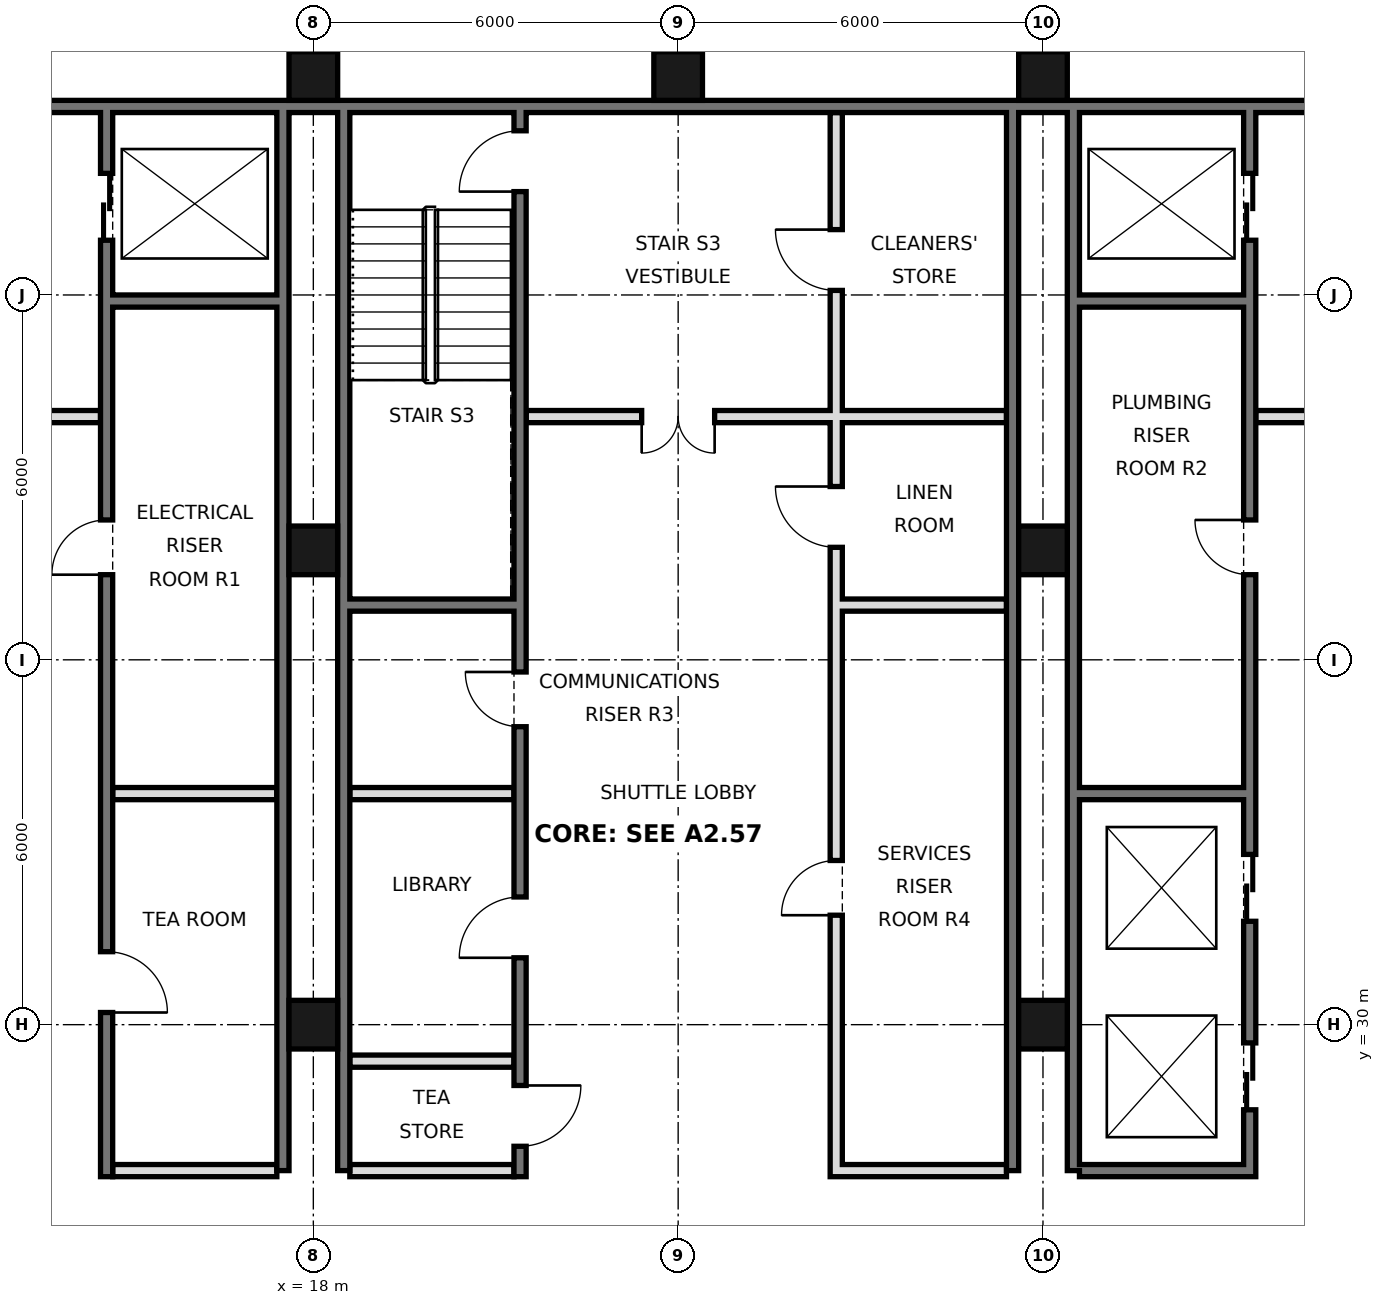
"""IFC4 building model, lengths in metres.
Left out: names, types, materials, properties, quantities, classifications, styles, units other than length and angle.
Written with IfcOpenShell. Run it as: python <this file> out.ifc"""

import sys

from ifc_helpers import new_model, si_unit, direction, frame, frame_2d, origin, origin_2d, place, context, subcontext, project, spatial, rectangle, hollow_rectangle, extrude, element, fill, save


model = new_model("IFC4")
c1 = context("Model", 3, precision=1e-05, world=origin(), true_north=direction((0.0, 1.0)))
c2 = subcontext(c1, "Body", "Model", "MODEL_VIEW")
j1 = project(units=[si_unit("LENGTHUNIT", "METRE"), si_unit("PLANEANGLEUNIT", "RADIAN")], contexts=[c1])
p1 = place(None, origin())
s1 = spatial("IfcSite", under=j1, at=p1, CompositionType="ELEMENT")
p2 = place(p1, origin())
s2 = spatial("IfcBuilding", under=s1, at=p2, CompositionType="ELEMENT")
p3 = place(p2, frame((0.0, 0.0, 226.2)))
s3 = spatial("IfcBuildingStorey", under=s2, at=p3, CompositionType="ELEMENT", Elevation=226.2)
for number, where, z_axis, x_axis in (
    (1, (18.0, 30.0, 0.0), (0.0, 0.0, 1.0), (1.0, 0.0, 0.0)),
    (2, (18.0, 37.8, 0.0), (0.0, 0.0, 1.0), (1.0, 0.0, 0.0)),
    (3, (18.0, 45.6, 0.0), (0.0, 0.0, 1.0), (1.0, 0.0, 0.0)),
    (4, (24.0, 45.6, 0.0), (0.0, 0.0, 1.0), (1.0, 0.0, 0.0)),
    (5, (30.0, 30.0, 0.0), (0.0, 0.0, 1.0), (1.0, 0.0, 0.0)),
    (6, (30.0, 37.8, 0.0), (0.0, 0.0, 1.0), (1.0, 0.0, 0.0)),
    (7, (30.0, 45.6, 0.0), (0.0, 0.0, 1.0), (1.0, 0.0, 0.0)),
):
    element("IfcColumn", number, at=place(p3, frame(where, z_axis=z_axis, x_axis=x_axis)), inside=s3, PredefinedType="COLUMN", context=c2, shape_type="SweptSolid", body=[
        extrude(hollow_rectangle(XDim=0.8, YDim=0.8, WallThickness=0.04, at=origin_2d()), origin(), (0.0, 0.0, 1.0), 3.6),
    ])
p4 = place(p3, frame((6.6, 45.1, 0.0), z_axis=(0.0, 0.0, 1.0), x_axis=(1.0, 0.0, 0.0)))
e8 = element("IfcWall", 8, at=p4, inside=s3, PredefinedType="SOLIDWALL", context=c2, shape_type="SweptSolid", body=[
    extrude(rectangle(XDim=34.8, YDim=0.2, at=frame_2d((17.4, 0.0))), origin(), (0.0, 0.0, 1.0), 3.42),
])
for number, where, z_axis, x_axis in (
    (9, (17.5, 27.6, 0.0), (0.0, 0.0, 1.0), (0.0, 1.0, 0.0)),
    (10, (18.5, 27.6, 0.0), (0.0, 0.0, 1.0), (0.0, 1.0, 0.0)),
    (11, (29.5, 27.6, 0.0), (0.0, 0.0, 1.0), (0.0, 1.0, 0.0)),
    (12, (30.5, 27.6, 0.0), (0.0, 0.0, 1.0), (0.0, 1.0, 0.0)),
):
    element("IfcWall", number, at=place(p3, frame(where, z_axis=z_axis, x_axis=x_axis)), inside=s3, PredefinedType="SOLIDWALL", context=c2, shape_type="SweptSolid", body=[
        extrude(rectangle(XDim=17.5, YDim=0.2, at=frame_2d((8.75, 0.0))), origin(), (0.0, 0.0, 1.0), 3.42),
    ])
p5 = place(p3, frame((14.6, 27.5, 0.0), z_axis=(0.0, 0.0, 1.0), x_axis=(0.0, 1.0, 0.0)))
e13 = element("IfcWall", 13, at=p5, inside=s3, PredefinedType="SOLIDWALL", context=c2, shape_type="SweptSolid", body=[
    extrude(rectangle(XDim=17.5, YDim=0.2, at=frame_2d((8.75, 0.0))), origin(), (0.0, 0.0, 1.0), 3.42),
])
p6 = place(p5, frame((15.4, 0.0, 0.0)))
e14 = element("IfcOpeningElement", 14, at=p6, cuts=e13, PredefinedType="OPENING", context=c2, shape_type="SweptSolid", body=[
    extrude(rectangle(XDim=1.1, YDim=2.1, at=frame_2d((0.55, 1.05))), frame((0.0, 0.11, 0.0), z_axis=(0.0, -1.0, 0.0), x_axis=(1.0, 0.0, 0.0)), (0.0, 0.0, 1.0), 0.22),
])
p7 = place(p5, frame((2.7, 0.0, 0.0)))
e15 = element("IfcOpeningElement", 15, at=p7, cuts=e13, PredefinedType="OPENING", context=c2, shape_type="SweptSolid", body=[
    extrude(rectangle(XDim=1.0, YDim=2.1, at=frame_2d((0.5, 1.05))), frame((0.0, 0.11, 0.0), z_axis=(0.0, -1.0, 0.0), x_axis=(1.0, 0.0, 0.0)), (0.0, 0.0, 1.0), 0.22),
])
p8 = place(p5, frame((9.9, 0.0, 0.0)))
e16 = element("IfcOpeningElement", 16, at=p8, cuts=e13, PredefinedType="OPENING", context=c2, shape_type="SweptSolid", body=[
    extrude(rectangle(XDim=0.9, YDim=2.1, at=frame_2d((0.45, 1.05))), frame((0.0, 0.11, 0.0), z_axis=(0.0, -1.0, 0.0), x_axis=(1.0, 0.0, 0.0)), (0.0, 0.0, 1.0), 0.22),
])
p9 = place(p3, frame((21.4, 27.5, 0.0), z_axis=(0.0, 0.0, 1.0), x_axis=(0.0, 1.0, 0.0)))
e17 = element("IfcWall", 17, at=p9, inside=s3, PredefinedType="SOLIDWALL", context=c2, shape_type="SweptSolid", body=[
    extrude(rectangle(XDim=17.5, YDim=0.2, at=frame_2d((8.75, 0.0))), origin(), (0.0, 0.0, 1.0), 3.42),
])
p10 = place(p9, frame((0.5, 0.0, 0.0)))
e18 = element("IfcOpeningElement", 18, at=p10, cuts=e17, PredefinedType="OPENING", context=c2, shape_type="SweptSolid", body=[
    extrude(rectangle(XDim=1.0, YDim=2.1, at=frame_2d((0.5, 1.05))), frame((0.0, 0.11, 0.0), z_axis=(0.0, -1.0, 0.0), x_axis=(1.0, 0.0, 0.0)), (0.0, 0.0, 1.0), 0.22),
])
p11 = place(p9, frame((3.6, 0.0, 0.0)))
e19 = element("IfcOpeningElement", 19, at=p11, cuts=e17, PredefinedType="OPENING", context=c2, shape_type="SweptSolid", body=[
    extrude(rectangle(XDim=1.0, YDim=2.1, at=frame_2d((0.5, 1.05))), frame((0.0, 0.11, 0.0), z_axis=(0.0, -1.0, 0.0), x_axis=(1.0, 0.0, 0.0)), (0.0, 0.0, 1.0), 0.22),
])
p12 = place(p9, frame((16.2, 0.0, 0.0)))
e20 = element("IfcOpeningElement", 20, at=p12, cuts=e17, PredefinedType="OPENING", context=c2, shape_type="SweptSolid", body=[
    extrude(rectangle(XDim=1.0, YDim=2.1, at=frame_2d((0.5, 1.05))), frame((0.0, 0.11, 0.0), z_axis=(0.0, -1.0, 0.0), x_axis=(1.0, 0.0, 0.0)), (0.0, 0.0, 1.0), 0.22),
])
p13 = place(p9, frame((7.4, 0.0, 0.0)))
e21 = element("IfcOpeningElement", 21, at=p13, cuts=e17, PredefinedType="OPENING", context=c2, shape_type="SweptSolid", body=[
    extrude(rectangle(XDim=0.9, YDim=2.1, at=frame_2d((0.45, 1.05))), frame((0.0, 0.11, 0.0), z_axis=(0.0, -1.0, 0.0), x_axis=(1.0, 0.0, 0.0)), (0.0, 0.0, 1.0), 0.22),
])
p14 = place(p3, frame((26.6, 27.5, 0.0), z_axis=(0.0, 0.0, 1.0), x_axis=(0.0, 1.0, 0.0)))
e22 = element("IfcWall", 22, at=p14, inside=s3, PredefinedType="SOLIDWALL", context=c2, shape_type="SweptSolid", body=[
    extrude(rectangle(XDim=17.5, YDim=0.2, at=frame_2d((8.75, 0.0))), origin(), (0.0, 0.0, 1.0), 3.42),
])
p15 = place(p14, frame((4.3, 0.0, 0.0)))
e23 = element("IfcOpeningElement", 23, at=p15, cuts=e22, PredefinedType="OPENING", context=c2, shape_type="SweptSolid", body=[
    extrude(rectangle(XDim=0.9, YDim=2.1, at=frame_2d((0.45, 1.05))), frame((0.0, 0.11, 0.0), z_axis=(0.0, -1.0, 0.0), x_axis=(1.0, 0.0, 0.0)), (0.0, 0.0, 1.0), 0.22),
])
p16 = place(p14, frame((10.35, 0.0, 0.0)))
e24 = element("IfcOpeningElement", 24, at=p16, cuts=e22, PredefinedType="OPENING", context=c2, shape_type="SweptSolid", body=[
    extrude(rectangle(XDim=1.0, YDim=2.1, at=frame_2d((0.5, 1.05))), frame((0.0, 0.11, 0.0), z_axis=(0.0, -1.0, 0.0), x_axis=(1.0, 0.0, 0.0)), (0.0, 0.0, 1.0), 0.22),
])
p17 = place(p14, frame((14.575, 0.0, 0.0)))
e25 = element("IfcOpeningElement", 25, at=p17, cuts=e22, PredefinedType="OPENING", context=c2, shape_type="SweptSolid", body=[
    extrude(rectangle(XDim=1.0, YDim=2.1, at=frame_2d((0.5, 1.05))), frame((0.0, 0.11, 0.0), z_axis=(0.0, -1.0, 0.0), x_axis=(1.0, 0.0, 0.0)), (0.0, 0.0, 1.0), 0.22),
])
p18 = place(p3, frame((33.4, 27.5, 0.0), z_axis=(0.0, 0.0, 1.0), x_axis=(0.0, 1.0, 0.0)))
e26 = element("IfcWall", 26, at=p18, inside=s3, PredefinedType="SOLIDWALL", context=c2, shape_type="SweptSolid", body=[
    extrude(rectangle(XDim=17.5, YDim=0.2, at=frame_2d((8.75, 0.0))), origin(), (0.0, 0.0, 1.0), 3.42),
])
p19 = place(p18, frame((1.1, 0.0, 0.0)))
e27 = element("IfcOpeningElement", 27, at=p19, cuts=e26, PredefinedType="OPENING", context=c2, shape_type="SweptSolid", body=[
    extrude(rectangle(XDim=1.1, YDim=2.1, at=frame_2d((0.55, 1.05))), frame((0.0, 0.11, 0.0), z_axis=(0.0, -1.0, 0.0), x_axis=(1.0, 0.0, 0.0)), (0.0, 0.0, 1.0), 0.22),
])
p20 = place(p18, frame((4.2, 0.0, 0.0)))
e28 = element("IfcOpeningElement", 28, at=p20, cuts=e26, PredefinedType="OPENING", context=c2, shape_type="SweptSolid", body=[
    extrude(rectangle(XDim=1.1, YDim=2.1, at=frame_2d((0.55, 1.05))), frame((0.0, 0.11, 0.0), z_axis=(0.0, -1.0, 0.0), x_axis=(1.0, 0.0, 0.0)), (0.0, 0.0, 1.0), 0.22),
])
p21 = place(p18, frame((15.4, 0.0, 0.0)))
e29 = element("IfcOpeningElement", 29, at=p21, cuts=e26, PredefinedType="OPENING", context=c2, shape_type="SweptSolid", body=[
    extrude(rectangle(XDim=1.1, YDim=2.1, at=frame_2d((0.55, 1.05))), frame((0.0, 0.11, 0.0), z_axis=(0.0, -1.0, 0.0), x_axis=(1.0, 0.0, 0.0)), (0.0, 0.0, 1.0), 0.22),
])
p22 = place(p18, frame((9.9, 0.0, 0.0)))
e30 = element("IfcOpeningElement", 30, at=p22, cuts=e26, PredefinedType="OPENING", context=c2, shape_type="SweptSolid", body=[
    extrude(rectangle(XDim=0.9, YDim=2.1, at=frame_2d((0.45, 1.05))), frame((0.0, 0.11, 0.0), z_axis=(0.0, -1.0, 0.0), x_axis=(1.0, 0.0, 0.0)), (0.0, 0.0, 1.0), 0.22),
])
for number, where, z_axis, x_axis in (
    (31, (14.7, 27.6, 0.0), (0.0, 0.0, 1.0), (1.0, 0.0, 0.0)),
    (32, (18.6, 27.6, 0.0), (0.0, 0.0, 1.0), (1.0, 0.0, 0.0)),
):
    element("IfcWall", number, at=place(p3, frame(where, z_axis=z_axis, x_axis=x_axis)), inside=s3, PredefinedType="PARTITIONING", context=c2, shape_type="SweptSolid", body=[
        extrude(rectangle(XDim=2.7, YDim=0.2, at=frame_2d((1.35, 0.0))), origin(), (0.0, 0.0, 1.0), 3.42),
    ])
for number, where, z_axis, x_axis in (
    (33, (26.7, 27.6, 0.0), (0.0, 0.0, 1.0), (1.0, 0.0, 0.0)),
    (34, (30.6, 27.6, 0.0), (0.0, 0.0, 1.0), (1.0, 0.0, 0.0)),
):
    element("IfcWall", number, at=place(p3, frame(where, z_axis=z_axis, x_axis=x_axis)), inside=s3, PredefinedType="SOLIDWALL", context=c2, shape_type="SweptSolid", body=[
        extrude(rectangle(XDim=2.7, YDim=0.2, at=frame_2d((1.35, 0.0))), origin(), (0.0, 0.0, 1.0), 3.42),
    ])
p23 = place(p3, frame((18.6, 29.4, 0.0), z_axis=(0.0, 0.0, 1.0), x_axis=(1.0, 0.0, 0.0)))
e35 = element("IfcWall", 35, at=p23, inside=s3, PredefinedType="PARTITIONING", context=c2, shape_type="SweptSolid", body=[
    extrude(rectangle(XDim=2.7, YDim=0.2, at=frame_2d((1.35, 0.0))), origin(), (0.0, 0.0, 1.0), 3.42),
])
for number, where, z_axis, x_axis in (
    (36, (14.7, 33.8, 0.0), (0.0, 0.0, 1.0), (1.0, 0.0, 0.0)),
    (37, (18.6, 33.8, 0.0), (0.0, 0.0, 1.0), (1.0, 0.0, 0.0)),
    (38, (30.6, 33.8, 0.0), (0.0, 0.0, 1.0), (1.0, 0.0, 0.0)),
    (39, (18.6, 36.9, 0.0), (0.0, 0.0, 1.0), (1.0, 0.0, 0.0)),
    (40, (26.7, 36.9, 0.0), (0.0, 0.0, 1.0), (1.0, 0.0, 0.0)),
):
    element("IfcWall", number, at=place(p3, frame(where, z_axis=z_axis, x_axis=x_axis)), inside=s3, PredefinedType="SOLIDWALL", context=c2, shape_type="SweptSolid", body=[
        extrude(rectangle(XDim=2.7, YDim=0.2, at=frame_2d((1.35, 0.0))), origin(), (0.0, 0.0, 1.0), 3.42),
    ])
p24 = place(p3, frame((21.5, 40.0, 0.0), z_axis=(0.0, 0.0, 1.0), x_axis=(1.0, 0.0, 0.0)))
e41 = element("IfcWall", 41, at=p24, inside=s3, PredefinedType="PARTITIONING", context=c2, shape_type="SweptSolid", body=[
    extrude(rectangle(XDim=7.9, YDim=0.2, at=frame_2d((3.95, 0.0))), origin(), (0.0, 0.0, 1.0), 3.42),
])
p25 = place(p24, frame((1.9, 0.0, 0.0)))
e42 = element("IfcOpeningElement", 42, at=p25, cuts=e41, PredefinedType="OPENING", context=c2, shape_type="SweptSolid", body=[
    extrude(rectangle(XDim=1.2, YDim=2.1, at=frame_2d((0.6, 1.05))), frame((0.0, 0.11, 0.0), z_axis=(0.0, -1.0, 0.0), x_axis=(1.0, 0.0, 0.0)), (0.0, 0.0, 1.0), 0.22),
])
p26 = place(p3, frame((33.5, 40.0, 0.0), z_axis=(0.0, 0.0, 1.0), x_axis=(1.0, 0.0, 0.0)))
e43 = element("IfcWall", 43, at=p26, inside=s3, PredefinedType="PARTITIONING", context=c2, shape_type="SweptSolid", body=[
    extrude(rectangle(XDim=5.0, YDim=0.2, at=frame_2d((2.5, 0.0))), origin(), (0.0, 0.0, 1.0), 3.42),
])
p27 = place(p26, frame((1.9, 0.0, 0.0)))
e44 = element("IfcOpeningElement", 44, at=p27, cuts=e43, PredefinedType="OPENING", context=c2, shape_type="SweptSolid", body=[
    extrude(rectangle(XDim=1.2, YDim=2.1, at=frame_2d((0.6, 1.05))), frame((0.0, 0.11, 0.0), z_axis=(0.0, -1.0, 0.0), x_axis=(1.0, 0.0, 0.0)), (0.0, 0.0, 1.0), 0.22),
])
p28 = place(p3, frame((9.5, 40.0, 0.0), z_axis=(0.0, 0.0, 1.0), x_axis=(1.0, 0.0, 0.0)))
e45 = element("IfcWall", 45, at=p28, inside=s3, PredefinedType="PARTITIONING", context=c2, shape_type="SweptSolid", body=[
    extrude(rectangle(XDim=5.0, YDim=0.2, at=frame_2d((2.5, 0.0))), origin(), (0.0, 0.0, 1.0), 3.42),
])
p29 = place(p28, frame((1.9, 0.0, 0.0)))
e46 = element("IfcOpeningElement", 46, at=p29, cuts=e45, PredefinedType="OPENING", context=c2, shape_type="SweptSolid", body=[
    extrude(rectangle(XDim=1.2, YDim=2.1, at=frame_2d((0.6, 1.05))), frame((0.0, 0.11, 0.0), z_axis=(0.0, -1.0, 0.0), x_axis=(1.0, 0.0, 0.0)), (0.0, 0.0, 1.0), 0.22),
])
for number, where, z_axis, x_axis in (
    (47, (14.7, 41.9, 0.0), (0.0, 0.0, 1.0), (1.0, 0.0, 0.0)),
    (48, (30.6, 41.9, 0.0), (0.0, 0.0, 1.0), (1.0, 0.0, 0.0)),
):
    element("IfcWall", number, at=place(p3, frame(where, z_axis=z_axis, x_axis=x_axis)), inside=s3, PredefinedType="SOLIDWALL", context=c2, shape_type="SweptSolid", body=[
        extrude(rectangle(XDim=2.7, YDim=0.2, at=frame_2d((1.35, 0.0))), origin(), (0.0, 0.0, 1.0), 3.42),
    ])
p30 = place(p25, frame((1.2, 0.0, 0.0), z_axis=(0.0, 0.0, 1.0), x_axis=(-1.0, 0.0, 0.0)))
e49 = element("IfcDoor", 49, at=p30, inside=s3, OperationType="DOUBLE_DOOR_SINGLE_SWING", PredefinedType="DOOR", context=c2, shape_type="SweptSolid", body=[
    extrude(rectangle(XDim=1.2, YDim=2.1, at=frame_2d((0.6, 1.05))), frame((0.0, 0.025, 0.0), z_axis=(0.0, -1.0, 0.0), x_axis=(1.0, 0.0, 0.0)), (0.0, 0.0, 1.0), 0.05),
])
fill(e42, e49)
p31 = place(p19, origin())
e50 = element("IfcDoor", 50, at=p31, inside=s3, OperationType="DOUBLE_DOOR_SLIDING", PredefinedType="DOOR", context=c2, shape_type="SweptSolid", body=[
    extrude(rectangle(XDim=1.1, YDim=2.1, at=frame_2d((0.55, 1.05))), frame((0.0, 0.025, 0.0), z_axis=(0.0, -1.0, 0.0), x_axis=(1.0, 0.0, 0.0)), (0.0, 0.0, 1.0), 0.05),
])
fill(e27, e50)
p32 = place(p20, origin())
e51 = element("IfcDoor", 51, at=p32, inside=s3, OperationType="DOUBLE_DOOR_SLIDING", PredefinedType="DOOR", context=c2, shape_type="SweptSolid", body=[
    extrude(rectangle(XDim=1.1, YDim=2.1, at=frame_2d((0.55, 1.05))), frame((0.0, 0.025, 0.0), z_axis=(0.0, -1.0, 0.0), x_axis=(1.0, 0.0, 0.0)), (0.0, 0.0, 1.0), 0.05),
])
fill(e28, e51)
p33 = place(p21, origin())
e52 = element("IfcDoor", 52, at=p33, inside=s3, OperationType="DOUBLE_DOOR_SLIDING", PredefinedType="DOOR", context=c2, shape_type="SweptSolid", body=[
    extrude(rectangle(XDim=1.1, YDim=2.1, at=frame_2d((0.55, 1.05))), frame((0.0, 0.025, 0.0), z_axis=(0.0, -1.0, 0.0), x_axis=(1.0, 0.0, 0.0)), (0.0, 0.0, 1.0), 0.05),
])
fill(e29, e52)
p34 = place(p6, origin())
e53 = element("IfcDoor", 53, at=p34, inside=s3, OperationType="DOUBLE_DOOR_SLIDING", PredefinedType="DOOR", context=c2, shape_type="SweptSolid", body=[
    extrude(rectangle(XDim=1.1, YDim=2.1, at=frame_2d((0.55, 1.05))), frame((0.0, 0.025, 0.0), z_axis=(0.0, -1.0, 0.0), x_axis=(1.0, 0.0, 0.0)), (0.0, 0.0, 1.0), 0.05),
])
fill(e14, e53)
p35 = place(p10, origin())
e54 = element("IfcDoor", 54, at=p35, inside=s3, OperationType="SINGLE_SWING_RIGHT", PredefinedType="DOOR", context=c2, shape_type="SweptSolid", body=[
    extrude(rectangle(XDim=1.0, YDim=2.1, at=frame_2d((0.5, 1.05))), frame((0.0, 0.025, 0.0), z_axis=(0.0, -1.0, 0.0), x_axis=(1.0, 0.0, 0.0)), (0.0, 0.0, 1.0), 0.05),
])
fill(e18, e54)
p36 = place(p11, origin())
e55 = element("IfcDoor", 55, at=p36, inside=s3, OperationType="SINGLE_SWING_LEFT", PredefinedType="DOOR", context=c2, shape_type="SweptSolid", body=[
    extrude(rectangle(XDim=1.0, YDim=2.1, at=frame_2d((0.5, 1.05))), frame((0.0, 0.025, 0.0), z_axis=(0.0, -1.0, 0.0), x_axis=(1.0, 0.0, 0.0)), (0.0, 0.0, 1.0), 0.05),
])
fill(e19, e55)
p37 = place(p7, frame((1.0, 0.0, 0.0), z_axis=(0.0, 0.0, 1.0), x_axis=(-1.0, 0.0, 0.0)))
e56 = element("IfcDoor", 56, at=p37, inside=s3, OperationType="SINGLE_SWING_RIGHT", PredefinedType="DOOR", context=c2, shape_type="SweptSolid", body=[
    extrude(rectangle(XDim=1.0, YDim=2.1, at=frame_2d((0.5, 1.05))), frame((0.0, 0.025, 0.0), z_axis=(0.0, -1.0, 0.0), x_axis=(1.0, 0.0, 0.0)), (0.0, 0.0, 1.0), 0.05),
])
fill(e15, e56)
p38 = place(p12, origin())
e57 = element("IfcDoor", 57, at=p38, inside=s3, OperationType="SINGLE_SWING_LEFT", PredefinedType="DOOR", context=c2, shape_type="SweptSolid", body=[
    extrude(rectangle(XDim=1.0, YDim=2.1, at=frame_2d((0.5, 1.05))), frame((0.0, 0.025, 0.0), z_axis=(0.0, -1.0, 0.0), x_axis=(1.0, 0.0, 0.0)), (0.0, 0.0, 1.0), 0.05),
])
fill(e20, e57)
p39 = place(p8, origin())
e58 = element("IfcDoor", 58, at=p39, inside=s3, OperationType="SINGLE_SWING_LEFT", PredefinedType="DOOR", context=c2, shape_type="SweptSolid", body=[
    extrude(rectangle(XDim=0.9, YDim=2.1, at=frame_2d((0.45, 1.05))), frame((0.0, 0.025, 0.0), z_axis=(0.0, -1.0, 0.0), x_axis=(1.0, 0.0, 0.0)), (0.0, 0.0, 1.0), 0.05),
])
fill(e16, e58)
p40 = place(p22, frame((0.9, 0.0, 0.0), z_axis=(0.0, 0.0, 1.0), x_axis=(-1.0, 0.0, 0.0)))
e59 = element("IfcDoor", 59, at=p40, inside=s3, OperationType="SINGLE_SWING_LEFT", PredefinedType="DOOR", context=c2, shape_type="SweptSolid", body=[
    extrude(rectangle(XDim=0.9, YDim=2.1, at=frame_2d((0.45, 1.05))), frame((0.0, 0.025, 0.0), z_axis=(0.0, -1.0, 0.0), x_axis=(1.0, 0.0, 0.0)), (0.0, 0.0, 1.0), 0.05),
])
fill(e30, e59)
p41 = place(p13, frame((0.9, 0.0, 0.0), z_axis=(0.0, 0.0, 1.0), x_axis=(-1.0, 0.0, 0.0)))
e60 = element("IfcDoor", 60, at=p41, inside=s3, OperationType="SINGLE_SWING_LEFT", PredefinedType="DOOR", context=c2, shape_type="SweptSolid", body=[
    extrude(rectangle(XDim=0.9, YDim=2.1, at=frame_2d((0.45, 1.05))), frame((0.0, 0.025, 0.0), z_axis=(0.0, -1.0, 0.0), x_axis=(1.0, 0.0, 0.0)), (0.0, 0.0, 1.0), 0.05),
])
fill(e21, e60)
p42 = place(p15, origin())
e61 = element("IfcDoor", 61, at=p42, inside=s3, OperationType="SINGLE_SWING_LEFT", PredefinedType="DOOR", context=c2, shape_type="SweptSolid", body=[
    extrude(rectangle(XDim=0.9, YDim=2.1, at=frame_2d((0.45, 1.05))), frame((0.0, 0.025, 0.0), z_axis=(0.0, -1.0, 0.0), x_axis=(1.0, 0.0, 0.0)), (0.0, 0.0, 1.0), 0.05),
])
fill(e23, e61)
p43 = place(p16, frame((1.0, 0.0, 0.0), z_axis=(0.0, 0.0, 1.0), x_axis=(-1.0, 0.0, 0.0)))
e62 = element("IfcDoor", 62, at=p43, inside=s3, OperationType="SINGLE_SWING_LEFT", PredefinedType="DOOR", context=c2, shape_type="SweptSolid", body=[
    extrude(rectangle(XDim=1.0, YDim=2.1, at=frame_2d((0.5, 1.05))), frame((0.0, 0.025, 0.0), z_axis=(0.0, -1.0, 0.0), x_axis=(1.0, 0.0, 0.0)), (0.0, 0.0, 1.0), 0.05),
])
fill(e24, e62)
p44 = place(p17, frame((1.0, 0.0, 0.0), z_axis=(0.0, 0.0, 1.0), x_axis=(-1.0, 0.0, 0.0)))
e63 = element("IfcDoor", 63, at=p44, inside=s3, OperationType="SINGLE_SWING_LEFT", PredefinedType="DOOR", context=c2, shape_type="SweptSolid", body=[
    extrude(rectangle(XDim=1.0, YDim=2.1, at=frame_2d((0.5, 1.05))), frame((0.0, 0.025, 0.0), z_axis=(0.0, -1.0, 0.0), x_axis=(1.0, 0.0, 0.0)), (0.0, 0.0, 1.0), 0.05),
])
fill(e25, e63)
save(model, sys.argv[1])
